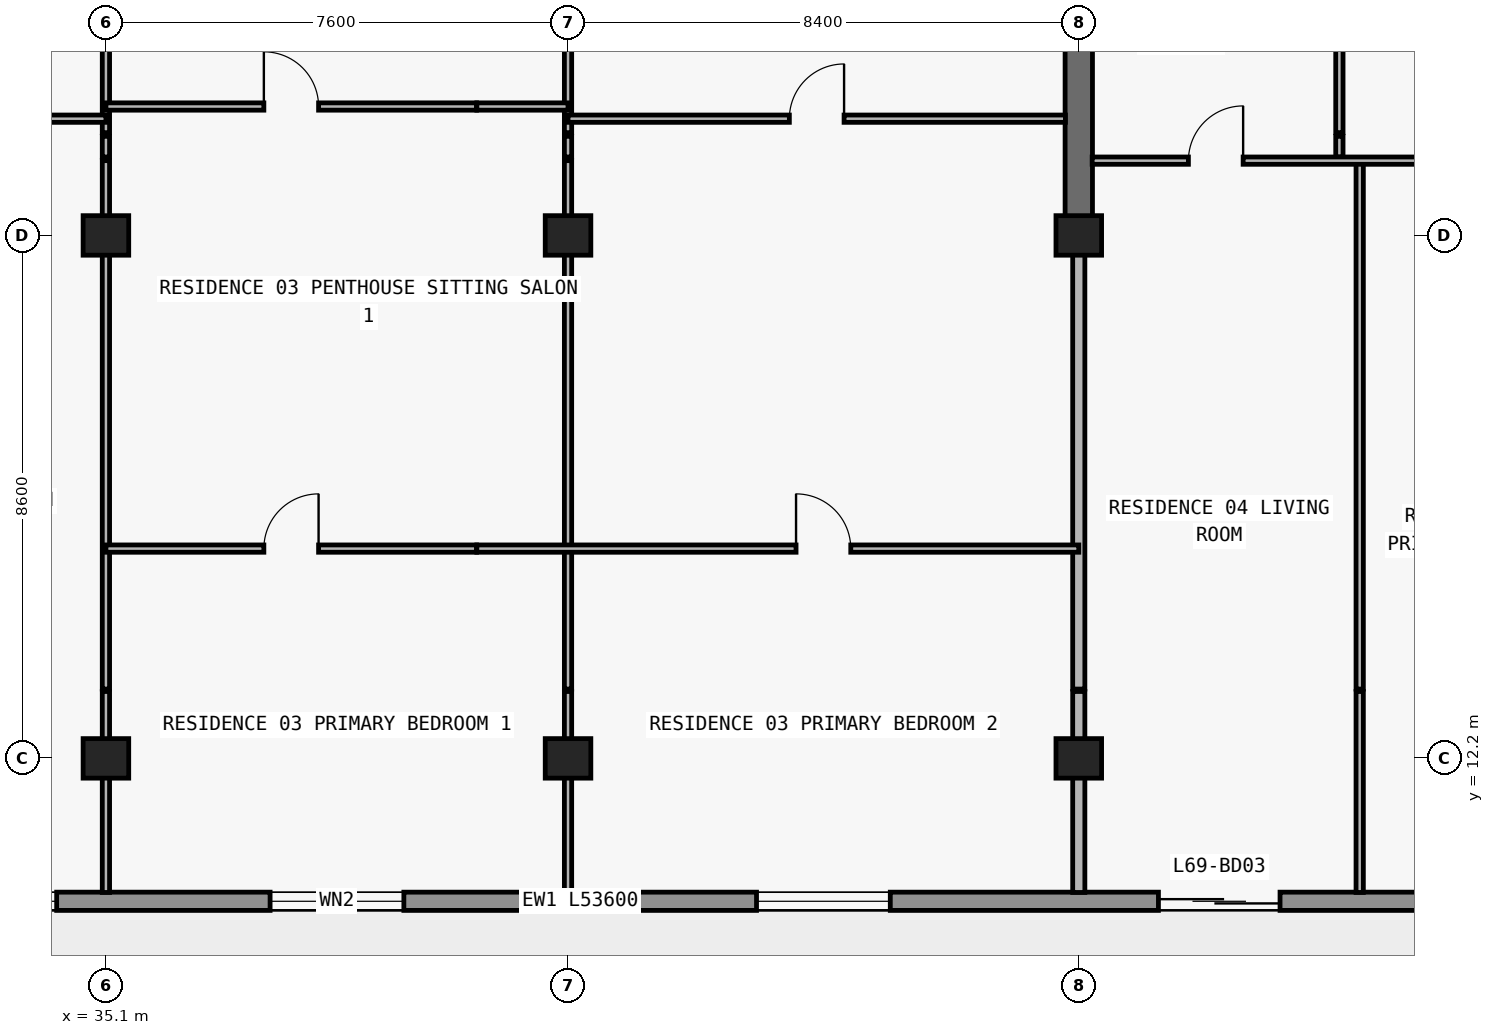
"""IFC4 building model, lengths in metres.
Left out: names, types, materials, properties, quantities, classifications, styles, units other than length and angle.
Written with IfcOpenShell. Run it as: python <this file> out.ifc"""

import sys

from ifc_helpers import new_model, si_unit, direction, frame, frame_2d, origin, origin_2d, place, context, subcontext, project, spatial, rectangle, extrude, element, fill, save


model = new_model("IFC4")
c1 = context("Model", 3, precision=1e-05, world=origin(), true_north=direction((0.0, 1.0)))
c2 = subcontext(c1, "Body", "Model", "MODEL_VIEW")
j1 = project(units=[si_unit("LENGTHUNIT", "METRE"), si_unit("PLANEANGLEUNIT", "RADIAN")], contexts=[c1])
p1 = place(None, origin())
s1 = spatial("IfcSite", under=j1, at=p1, CompositionType="ELEMENT")
p2 = place(p1, origin())
s2 = spatial("IfcBuilding", under=s1, at=p2, CompositionType="ELEMENT")
p3 = place(p2, frame((0.0, 0.0, 246.3)))
s3 = spatial("IfcBuildingStorey", under=s2, at=p3, CompositionType="ELEMENT", Elevation=246.3)
for number, where, z_axis, x_axis in (
    (1, (35.1, 12.2, 0.0), (0.0, 0.0, 1.0), (1.0, 0.0, 0.0)),
    (2, (42.7, 12.2, 0.0), (0.0, 0.0, 1.0), (1.0, 0.0, 0.0)),
    (3, (51.1, 12.2, 0.0), (0.0, 0.0, 1.0), (1.0, 0.0, 0.0)),
    (4, (35.1, 20.8, 0.0), (0.0, 0.0, 1.0), (1.0, 0.0, 0.0)),
    (5, (42.7, 20.8, 0.0), (0.0, 0.0, 1.0), (1.0, 0.0, 0.0)),
    (6, (51.1, 20.8, 0.0), (0.0, 0.0, 1.0), (1.0, 0.0, 0.0)),
):
    element("IfcColumn", number, at=place(p3, frame(where, z_axis=z_axis, x_axis=x_axis)), inside=s3, PredefinedType="COLUMN", context=c2, shape_type="SweptSolid", body=[
        extrude(rectangle(XDim=0.75, YDim=0.65, at=origin_2d()), origin(), (0.0, 0.0, 1.0), 3.05),
    ])
p4 = place(p3, frame((51.1, 20.8, 0.0), z_axis=(0.0, 0.0, 1.0), x_axis=(0.0, 1.0, 0.0)))
e7 = element("IfcWall", 7, at=p4, inside=s3, PredefinedType="SHEAR", context=c2, shape_type="SweptSolid", body=[
    extrude(rectangle(XDim=8.6, YDim=0.45, at=frame_2d((4.3, 0.0))), origin(), (0.0, 0.0, 1.0), 3.05),
])
p5 = place(p3, frame((65.7, 9.85, 0.0), z_axis=(0.0, 0.0, 1.0), x_axis=(-1.0, 0.0, 0.0)))
e8 = element("IfcWall", 8, at=p5, inside=s3, PredefinedType="STANDARD", context=c2, shape_type="SweptSolid", body=[
    extrude(rectangle(XDim=53.6, YDim=0.3, at=frame_2d((26.8, 0.0))), origin(), (0.0, 0.0, 1.0), 3.05),
])
p6 = place(p5, frame((48.05, 0.0, 0.85)))
e9 = element("IfcOpeningElement", 9, at=p6, cuts=e8, PredefinedType="OPENING", context=c2, shape_type="SweptSolid", body=[
    extrude(rectangle(XDim=1.8, YDim=1.55, at=frame_2d((0.9, 0.775))), frame((0.0, 0.16, 0.0), z_axis=(0.0, -1.0, 0.0), x_axis=(1.0, 0.0, 0.0)), (0.0, 0.0, 1.0), 0.32),
])
p7 = place(p5, frame((44.09, 0.0, 0.0)))
e10 = element("IfcOpeningElement", 10, at=p7, cuts=e8, PredefinedType="OPENING", context=c2, shape_type="SweptSolid", body=[
    extrude(rectangle(XDim=2.0, YDim=2.3, at=frame_2d((1.0, 1.15))), frame((0.0, 0.16, 0.0), z_axis=(0.0, -1.0, 0.0), x_axis=(1.0, 0.0, 0.0)), (0.0, 0.0, 1.0), 0.32),
])
p8 = place(p5, frame((39.99, 0.0, 0.85)))
e11 = element("IfcOpeningElement", 11, at=p8, cuts=e8, PredefinedType="OPENING", context=c2, shape_type="SweptSolid", body=[
    extrude(rectangle(XDim=1.8, YDim=1.55, at=frame_2d((0.9, 0.775))), frame((0.0, 0.16, 0.0), z_axis=(0.0, -1.0, 0.0), x_axis=(1.0, 0.0, 0.0)), (0.0, 0.0, 1.0), 0.32),
])
p9 = place(p5, frame((36.09, 0.0, 0.0)))
e12 = element("IfcOpeningElement", 12, at=p9, cuts=e8, PredefinedType="OPENING", context=c2, shape_type="SweptSolid", body=[
    extrude(rectangle(XDim=2.0, YDim=2.3, at=frame_2d((1.0, 1.15))), frame((0.0, 0.16, 0.0), z_axis=(0.0, -1.0, 0.0), x_axis=(1.0, 0.0, 0.0)), (0.0, 0.0, 1.0), 0.32),
])
p10 = place(p5, frame((31.41, 0.0, 0.65)))
e13 = element("IfcOpeningElement", 13, at=p10, cuts=e8, PredefinedType="OPENING", context=c2, shape_type="SweptSolid", body=[
    extrude(rectangle(XDim=2.6, YDim=1.85, at=frame_2d((1.3, 0.925))), frame((0.0, 0.16, 0.0), z_axis=(0.0, -1.0, 0.0), x_axis=(1.0, 0.0, 0.0)), (0.0, 0.0, 1.0), 0.32),
])
p11 = place(p5, frame((25.7, 0.0, 0.85)))
e14 = element("IfcOpeningElement", 14, at=p11, cuts=e8, PredefinedType="OPENING", context=c2, shape_type="SweptSolid", body=[
    extrude(rectangle(XDim=2.2, YDim=1.55, at=frame_2d((1.1, 0.775))), frame((0.0, 0.16, 0.0), z_axis=(0.0, -1.0, 0.0), x_axis=(1.0, 0.0, 0.0)), (0.0, 0.0, 1.0), 0.32),
])
p12 = place(p5, frame((17.7, 0.0, 0.85)))
e15 = element("IfcOpeningElement", 15, at=p12, cuts=e8, PredefinedType="OPENING", context=c2, shape_type="SweptSolid", body=[
    extrude(rectangle(XDim=2.2, YDim=1.55, at=frame_2d((1.1, 0.775))), frame((0.0, 0.16, 0.0), z_axis=(0.0, -1.0, 0.0), x_axis=(1.0, 0.0, 0.0)), (0.0, 0.0, 1.0), 0.32),
])
p13 = place(p5, frame((11.29, 0.0, 0.0)))
e16 = element("IfcOpeningElement", 16, at=p13, cuts=e8, PredefinedType="OPENING", context=c2, shape_type="SweptSolid", body=[
    extrude(rectangle(XDim=2.0, YDim=2.3, at=frame_2d((1.0, 1.15))), frame((0.0, 0.16, 0.0), z_axis=(0.0, -1.0, 0.0), x_axis=(1.0, 0.0, 0.0)), (0.0, 0.0, 1.0), 0.32),
])
p14 = place(p5, frame((7.19, 0.0, 0.85)))
e17 = element("IfcOpeningElement", 17, at=p14, cuts=e8, PredefinedType="OPENING", context=c2, shape_type="SweptSolid", body=[
    extrude(rectangle(XDim=1.8, YDim=1.55, at=frame_2d((0.9, 0.775))), frame((0.0, 0.16, 0.0), z_axis=(0.0, -1.0, 0.0), x_axis=(1.0, 0.0, 0.0)), (0.0, 0.0, 1.0), 0.32),
])
p15 = place(p5, frame((0.65, 0.0, 0.85)))
e18 = element("IfcOpeningElement", 18, at=p15, cuts=e8, PredefinedType="OPENING", context=c2, shape_type="SweptSolid", body=[
    extrude(rectangle(XDim=1.8, YDim=1.55, at=frame_2d((0.9, 0.775))), frame((0.0, 0.16, 0.0), z_axis=(0.0, -1.0, 0.0), x_axis=(1.0, 0.0, 0.0)), (0.0, 0.0, 1.0), 0.32),
])
p16 = place(p3, frame((35.1, 9.995, 0.0), z_axis=(0.0, 0.0, 1.0), x_axis=(0.0, 1.0, 0.0)))
e19 = element("IfcWall", 19, at=p16, inside=s3, PredefinedType="PARTITIONING", context=c2, shape_type="SweptSolid", body=[
    extrude(rectangle(XDim=3.305, YDim=0.12, at=frame_2d((1.652, 0.0))), origin(), (0.0, 0.0, 1.0), 2.263),
])
p17 = place(p3, frame((35.1, 13.34, 0.0), z_axis=(0.0, 0.0, 1.0), x_axis=(0.0, 1.0, 0.0)))
e20 = element("IfcWall", 20, at=p17, inside=s3, PredefinedType="PARTITIONING", context=c2, shape_type="SweptSolid", body=[
    extrude(rectangle(XDim=8.69, YDim=0.12, at=frame_2d((4.345, 0.0))), origin(), (0.0, 0.0, 1.0), 2.263),
])
p18 = place(p3, frame((35.1, 22.09, 0.0), z_axis=(0.0, 0.0, 1.0), x_axis=(0.0, 1.0, 0.0)))
e21 = element("IfcWall", 21, at=p18, inside=s3, PredefinedType="PARTITIONING", context=c2, shape_type="SweptSolid", body=[
    extrude(rectangle(XDim=0.34, YDim=0.12, at=frame_2d((0.17, 0.0))), origin(), (0.0, 0.0, 1.0), 2.263),
])
p19 = place(p3, frame((35.1, 22.49, 0.0), z_axis=(0.0, 0.0, 1.0), x_axis=(0.0, 1.0, 0.0)))
e22 = element("IfcWall", 22, at=p19, inside=s3, PredefinedType="PARTITIONING", context=c2, shape_type="SweptSolid", body=[
    extrude(rectangle(XDim=4.69, YDim=0.12, at=frame_2d((2.345, 0.0))), origin(), (0.0, 0.0, 1.0), 2.263),
])
p20 = place(p19, frame((2.11, 0.0, 0.0)))
e23 = element("IfcOpeningElement", 23, at=p20, cuts=e22, PredefinedType="OPENING", context=c2, shape_type="SweptSolid", body=[
    extrude(rectangle(XDim=0.9, YDim=2.15, at=frame_2d((0.45, 1.075))), frame((0.0, 0.07, 0.0), z_axis=(0.0, -1.0, 0.0), x_axis=(1.0, 0.0, 0.0)), (0.0, 0.0, 1.0), 0.14),
])
p21 = place(p3, frame((42.7, 9.995, 0.0), z_axis=(0.0, 0.0, 1.0), x_axis=(0.0, 1.0, 0.0)))
e24 = element("IfcWall", 24, at=p21, inside=s3, PredefinedType="PARTITIONING", context=c2, shape_type="SweptSolid", body=[
    extrude(rectangle(XDim=3.305, YDim=0.12, at=frame_2d((1.652, 0.0))), origin(), (0.0, 0.0, 1.0), 2.263),
])
p22 = place(p3, frame((42.7, 13.34, 0.0), z_axis=(0.0, 0.0, 1.0), x_axis=(0.0, 1.0, 0.0)))
e25 = element("IfcWall", 25, at=p22, inside=s3, PredefinedType="PARTITIONING", context=c2, shape_type="SweptSolid", body=[
    extrude(rectangle(XDim=8.69, YDim=0.12, at=frame_2d((4.345, 0.0))), origin(), (0.0, 0.0, 1.0), 2.263),
])
p23 = place(p3, frame((42.7, 22.09, 0.0), z_axis=(0.0, 0.0, 1.0), x_axis=(0.0, 1.0, 0.0)))
e26 = element("IfcWall", 26, at=p23, inside=s3, PredefinedType="PARTITIONING", context=c2, shape_type="SweptSolid", body=[
    extrude(rectangle(XDim=0.34, YDim=0.12, at=frame_2d((0.17, 0.0))), origin(), (0.0, 0.0, 1.0), 2.263),
])
p24 = place(p3, frame((42.7, 22.49, 0.0), z_axis=(0.0, 0.0, 1.0), x_axis=(0.0, 1.0, 0.0)))
e27 = element("IfcWall", 27, at=p24, inside=s3, PredefinedType="PARTITIONING", context=c2, shape_type="SweptSolid", body=[
    extrude(rectangle(XDim=4.69, YDim=0.12, at=frame_2d((2.345, 0.0))), origin(), (0.0, 0.0, 1.0), 2.263),
])
p25 = place(p24, frame((2.11, 0.0, 0.0)))
e28 = element("IfcOpeningElement", 28, at=p25, cuts=e27, PredefinedType="OPENING", context=c2, shape_type="SweptSolid", body=[
    extrude(rectangle(XDim=0.9, YDim=2.15, at=frame_2d((0.45, 1.075))), frame((0.0, 0.07, 0.0), z_axis=(0.0, -1.0, 0.0), x_axis=(1.0, 0.0, 0.0)), (0.0, 0.0, 1.0), 0.14),
])
p26 = place(p3, frame((51.1, 9.995, 0.0), z_axis=(0.0, 0.0, 1.0), x_axis=(0.0, 1.0, 0.0)))
e29 = element("IfcWall", 29, at=p26, inside=s3, PredefinedType="PARTITIONING", context=c2, shape_type="SweptSolid", body=[
    extrude(rectangle(XDim=3.305, YDim=0.2, at=frame_2d((1.652, 0.0))), origin(), (0.0, 0.0, 1.0), 2.263),
])
p27 = place(p3, frame((51.1, 13.34, 0.0), z_axis=(0.0, 0.0, 1.0), x_axis=(0.0, 1.0, 0.0)))
e30 = element("IfcWall", 30, at=p27, inside=s3, PredefinedType="PARTITIONING", context=c2, shape_type="SweptSolid", body=[
    extrude(rectangle(XDim=7.455, YDim=0.2, at=frame_2d((3.728, 0.0))), origin(), (0.0, 0.0, 1.0), 2.263),
])
p28 = place(p3, frame((55.386, 22.09, 0.0), z_axis=(0.0, 0.0, 1.0), x_axis=(0.0, 1.0, 0.0)))
e31 = element("IfcWall", 31, at=p28, inside=s3, PredefinedType="PARTITIONING", context=c2, shape_type="SweptSolid", body=[
    extrude(rectangle(XDim=0.34, YDim=0.12, at=frame_2d((0.17, 0.0))), origin(), (0.0, 0.0, 1.0), 2.578),
])
p29 = place(p3, frame((55.386, 22.49, 0.0), z_axis=(0.0, 0.0, 1.0), x_axis=(0.0, 1.0, 0.0)))
e32 = element("IfcWall", 32, at=p29, inside=s3, PredefinedType="PARTITIONING", context=c2, shape_type="SweptSolid", body=[
    extrude(rectangle(XDim=4.69, YDim=0.12, at=frame_2d((2.345, 0.0))), origin(), (0.0, 0.0, 1.0), 2.578),
])
p30 = place(p29, frame((1.895, 0.0, 0.0)))
e33 = element("IfcOpeningElement", 33, at=p30, cuts=e32, PredefinedType="OPENING", context=c2, shape_type="SweptSolid", body=[
    extrude(rectangle(XDim=0.9, YDim=2.15, at=frame_2d((0.45, 1.075))), frame((0.0, 0.07, 0.0), z_axis=(0.0, -1.0, 0.0), x_axis=(1.0, 0.0, 0.0)), (0.0, 0.0, 1.0), 0.14),
])
p31 = place(p3, frame((55.72, 9.995, 0.0), z_axis=(0.0, 0.0, 1.0), x_axis=(0.0, 1.0, 0.0)))
e34 = element("IfcWall", 34, at=p31, inside=s3, PredefinedType="PARTITIONING", context=c2, shape_type="SweptSolid", body=[
    extrude(rectangle(XDim=3.305, YDim=0.12, at=frame_2d((1.652, 0.0))), origin(), (0.0, 0.0, 1.0), 3.05),
])
p32 = place(p3, frame((55.72, 13.34, 0.0), z_axis=(0.0, 0.0, 1.0), x_axis=(0.0, 1.0, 0.0)))
e35 = element("IfcWall", 35, at=p32, inside=s3, PredefinedType="PARTITIONING", context=c2, shape_type="SweptSolid", body=[
    extrude(rectangle(XDim=8.69, YDim=0.12, at=frame_2d((4.345, 0.0))), origin(), (0.0, 0.0, 1.0), 3.05),
])
p33 = place(p3, frame((35.1, 15.65, 0.0), z_axis=(0.0, 0.0, 1.0), x_axis=(1.0, 0.0, 0.0)))
e36 = element("IfcWall", 36, at=p33, inside=s3, PredefinedType="PARTITIONING", context=c2, shape_type="SweptSolid", body=[
    extrude(rectangle(XDim=6.095, YDim=0.12, at=frame_2d((3.047, 0.0))), origin(), (0.0, 0.0, 1.0), 3.05),
])
p34 = place(p33, frame((2.597, 0.0, 0.0)))
e37 = element("IfcOpeningElement", 37, at=p34, cuts=e36, PredefinedType="OPENING", context=c2, shape_type="SweptSolid", body=[
    extrude(rectangle(XDim=0.9, YDim=2.15, at=frame_2d((0.45, 1.075))), frame((0.0, 0.07, 0.0), z_axis=(0.0, -1.0, 0.0), x_axis=(1.0, 0.0, 0.0)), (0.0, 0.0, 1.0), 0.14),
])
p35 = place(p3, frame((41.2, 15.65, 0.0), z_axis=(0.0, 0.0, 1.0), x_axis=(1.0, 0.0, 0.0)))
e38 = element("IfcWall", 38, at=p35, inside=s3, PredefinedType="PARTITIONING", context=c2, shape_type="SweptSolid", body=[
    extrude(rectangle(XDim=9.9, YDim=0.12, at=frame_2d((4.95, 0.0))), origin(), (0.0, 0.0, 1.0), 3.05),
])
p36 = place(p35, frame((5.25, 0.0, 0.0)))
e39 = element("IfcOpeningElement", 39, at=p36, cuts=e38, PredefinedType="OPENING", context=c2, shape_type="SweptSolid", body=[
    extrude(rectangle(XDim=0.9, YDim=2.15, at=frame_2d((0.45, 1.075))), frame((0.0, 0.07, 0.0), z_axis=(0.0, -1.0, 0.0), x_axis=(1.0, 0.0, 0.0)), (0.0, 0.0, 1.0), 0.14),
])
p37 = place(p3, frame((51.32, 22.03, 0.0), z_axis=(0.0, 0.0, 1.0), x_axis=(1.0, 0.0, 0.0)))
e40 = element("IfcWall", 40, at=p37, inside=s3, PredefinedType="PARTITIONING", context=c2, shape_type="SweptSolid", body=[
    extrude(rectangle(XDim=8.18, YDim=0.12, at=frame_2d((4.09, 0.0))), origin(), (0.0, 0.0, 1.0), 3.05),
])
p38 = place(p37, frame((1.583, 0.0, 0.0)))
e41 = element("IfcOpeningElement", 41, at=p38, cuts=e40, PredefinedType="OPENING", context=c2, shape_type="SweptSolid", body=[
    extrude(rectangle(XDim=0.9, YDim=2.15, at=frame_2d((0.45, 1.075))), frame((0.0, 0.07, 0.0), z_axis=(0.0, -1.0, 0.0), x_axis=(1.0, 0.0, 0.0)), (0.0, 0.0, 1.0), 0.14),
])
p39 = place(p37, frame((5.84, 0.0, 0.0)))
e42 = element("IfcOpeningElement", 42, at=p39, cuts=e40, PredefinedType="OPENING", context=c2, shape_type="SweptSolid", body=[
    extrude(rectangle(XDim=0.9, YDim=2.15, at=frame_2d((0.45, 1.075))), frame((0.0, 0.07, 0.0), z_axis=(0.0, -1.0, 0.0), x_axis=(1.0, 0.0, 0.0)), (0.0, 0.0, 1.0), 0.14),
])
p40 = place(p3, frame((26.92, 22.72, 0.0), z_axis=(0.0, 0.0, 1.0), x_axis=(1.0, 0.0, 0.0)))
e43 = element("IfcWall", 43, at=p40, inside=s3, PredefinedType="PARTITIONING", context=c2, shape_type="SweptSolid", body=[
    extrude(rectangle(XDim=8.18, YDim=0.12, at=frame_2d((4.09, 0.0))), origin(), (0.0, 0.0, 1.0), 3.05),
])
p41 = place(p40, frame((1.33, 0.0, 0.0)))
e44 = element("IfcOpeningElement", 44, at=p41, cuts=e43, PredefinedType="OPENING", context=c2, shape_type="SweptSolid", body=[
    extrude(rectangle(XDim=0.9, YDim=2.15, at=frame_2d((0.45, 1.075))), frame((0.0, 0.07, 0.0), z_axis=(0.0, -1.0, 0.0), x_axis=(1.0, 0.0, 0.0)), (0.0, 0.0, 1.0), 0.14),
])
p42 = place(p3, frame((42.7, 22.72, 0.0), z_axis=(0.0, 0.0, 1.0), x_axis=(1.0, 0.0, 0.0)))
e45 = element("IfcWall", 45, at=p42, inside=s3, PredefinedType="PARTITIONING", context=c2, shape_type="SweptSolid", body=[
    extrude(rectangle(XDim=8.18, YDim=0.12, at=frame_2d((4.09, 0.0))), origin(), (0.0, 0.0, 1.0), 3.05),
])
p43 = place(p42, frame((3.64, 0.0, 0.0)))
e46 = element("IfcOpeningElement", 46, at=p43, cuts=e45, PredefinedType="OPENING", context=c2, shape_type="SweptSolid", body=[
    extrude(rectangle(XDim=0.9, YDim=2.15, at=frame_2d((0.45, 1.075))), frame((0.0, 0.07, 0.0), z_axis=(0.0, -1.0, 0.0), x_axis=(1.0, 0.0, 0.0)), (0.0, 0.0, 1.0), 0.14),
])
p44 = place(p3, frame((35.1, 22.92, 0.0), z_axis=(0.0, 0.0, 1.0), x_axis=(1.0, 0.0, 0.0)))
e47 = element("IfcWall", 47, at=p44, inside=s3, PredefinedType="PARTITIONING", context=c2, shape_type="SweptSolid", body=[
    extrude(rectangle(XDim=6.095, YDim=0.12, at=frame_2d((3.047, 0.0))), origin(), (0.0, 0.0, 1.0), 3.05),
])
p45 = place(p44, frame((2.597, 0.0, 0.0)))
e48 = element("IfcOpeningElement", 48, at=p45, cuts=e47, PredefinedType="OPENING", context=c2, shape_type="SweptSolid", body=[
    extrude(rectangle(XDim=0.9, YDim=2.15, at=frame_2d((0.45, 1.075))), frame((0.0, 0.07, 0.0), z_axis=(0.0, -1.0, 0.0), x_axis=(1.0, 0.0, 0.0)), (0.0, 0.0, 1.0), 0.14),
])
p46 = place(p3, frame((41.2, 22.92, 0.0), z_axis=(0.0, 0.0, 1.0), x_axis=(1.0, 0.0, 0.0)))
e49 = element("IfcWall", 49, at=p46, inside=s3, PredefinedType="PARTITIONING", context=c2, shape_type="SweptSolid", body=[
    extrude(rectangle(XDim=1.5, YDim=0.12, at=frame_2d((0.75, 0.0))), origin(), (0.0, 0.0, 1.0), 3.05),
])
p47 = place(p10, origin())
e50 = element("IfcWindow", 50, at=p47, inside=s3, PartitioningType="SINGLE_PANEL", PredefinedType="WINDOW", context=c2, shape_type="SweptSolid", body=[
    extrude(rectangle(XDim=2.6, YDim=1.85, at=frame_2d((1.3, 0.925))), frame((0.0, 0.03, 0.0), z_axis=(0.0, -1.0, 0.0), x_axis=(1.0, 0.0, 0.0)), (0.0, 0.0, 1.0), 0.06),
])
fill(e13, e50)
p48 = place(p11, origin())
e51 = element("IfcWindow", 51, at=p48, inside=s3, PartitioningType="SINGLE_PANEL", PredefinedType="WINDOW", context=c2, shape_type="SweptSolid", body=[
    extrude(rectangle(XDim=2.2, YDim=1.55, at=frame_2d((1.1, 0.775))), frame((0.0, 0.03, 0.0), z_axis=(0.0, -1.0, 0.0), x_axis=(1.0, 0.0, 0.0)), (0.0, 0.0, 1.0), 0.06),
])
fill(e14, e51)
p49 = place(p12, origin())
e52 = element("IfcWindow", 52, at=p49, inside=s3, PartitioningType="SINGLE_PANEL", PredefinedType="WINDOW", context=c2, shape_type="SweptSolid", body=[
    extrude(rectangle(XDim=2.2, YDim=1.55, at=frame_2d((1.1, 0.775))), frame((0.0, 0.03, 0.0), z_axis=(0.0, -1.0, 0.0), x_axis=(1.0, 0.0, 0.0)), (0.0, 0.0, 1.0), 0.06),
])
fill(e15, e52)
p50 = place(p13, origin())
e53 = element("IfcDoor", 53, at=p50, inside=s3, OperationType="DOUBLE_DOOR_SLIDING", PredefinedType="DOOR", context=c2, shape_type="SweptSolid", body=[
    extrude(rectangle(XDim=2.0, YDim=2.3, at=frame_2d((1.0, 1.15))), frame((0.0, 0.025, 0.0), z_axis=(0.0, -1.0, 0.0), x_axis=(1.0, 0.0, 0.0)), (0.0, 0.0, 1.0), 0.05),
])
fill(e16, e53)
p51 = place(p45, origin())
e54 = element("IfcDoor", 54, at=p51, inside=s3, OperationType="SINGLE_SWING_LEFT", PredefinedType="DOOR", context=c2, shape_type="SweptSolid", body=[
    extrude(rectangle(XDim=0.9, YDim=2.15, at=frame_2d((0.45, 1.075))), frame((0.0, 0.025, 0.0), z_axis=(0.0, -1.0, 0.0), x_axis=(1.0, 0.0, 0.0)), (0.0, 0.0, 1.0), 0.05),
])
fill(e48, e54)
p52 = place(p34, origin())
e55 = element("IfcDoor", 55, at=p52, inside=s3, OperationType="SINGLE_SWING_RIGHT", PredefinedType="DOOR", context=c2, shape_type="SweptSolid", body=[
    extrude(rectangle(XDim=0.9, YDim=2.15, at=frame_2d((0.45, 1.075))), frame((0.0, 0.025, 0.0), z_axis=(0.0, -1.0, 0.0), x_axis=(1.0, 0.0, 0.0)), (0.0, 0.0, 1.0), 0.05),
])
fill(e37, e55)
p53 = place(p43, origin())
e56 = element("IfcDoor", 56, at=p53, inside=s3, OperationType="SINGLE_SWING_RIGHT", PredefinedType="DOOR", context=c2, shape_type="SweptSolid", body=[
    extrude(rectangle(XDim=0.9, YDim=2.15, at=frame_2d((0.45, 1.075))), frame((0.0, 0.025, 0.0), z_axis=(0.0, -1.0, 0.0), x_axis=(1.0, 0.0, 0.0)), (0.0, 0.0, 1.0), 0.05),
])
fill(e46, e56)
p54 = place(p36, origin())
e57 = element("IfcDoor", 57, at=p54, inside=s3, OperationType="SINGLE_SWING_LEFT", PredefinedType="DOOR", context=c2, shape_type="SweptSolid", body=[
    extrude(rectangle(XDim=0.9, YDim=2.15, at=frame_2d((0.45, 1.075))), frame((0.0, 0.025, 0.0), z_axis=(0.0, -1.0, 0.0), x_axis=(1.0, 0.0, 0.0)), (0.0, 0.0, 1.0), 0.05),
])
fill(e39, e57)
p55 = place(p38, origin())
e58 = element("IfcDoor", 58, at=p55, inside=s3, OperationType="SINGLE_SWING_RIGHT", PredefinedType="DOOR", context=c2, shape_type="SweptSolid", body=[
    extrude(rectangle(XDim=0.9, YDim=2.15, at=frame_2d((0.45, 1.075))), frame((0.0, 0.025, 0.0), z_axis=(0.0, -1.0, 0.0), x_axis=(1.0, 0.0, 0.0)), (0.0, 0.0, 1.0), 0.05),
])
fill(e41, e58)
save(model, sys.argv[1])
